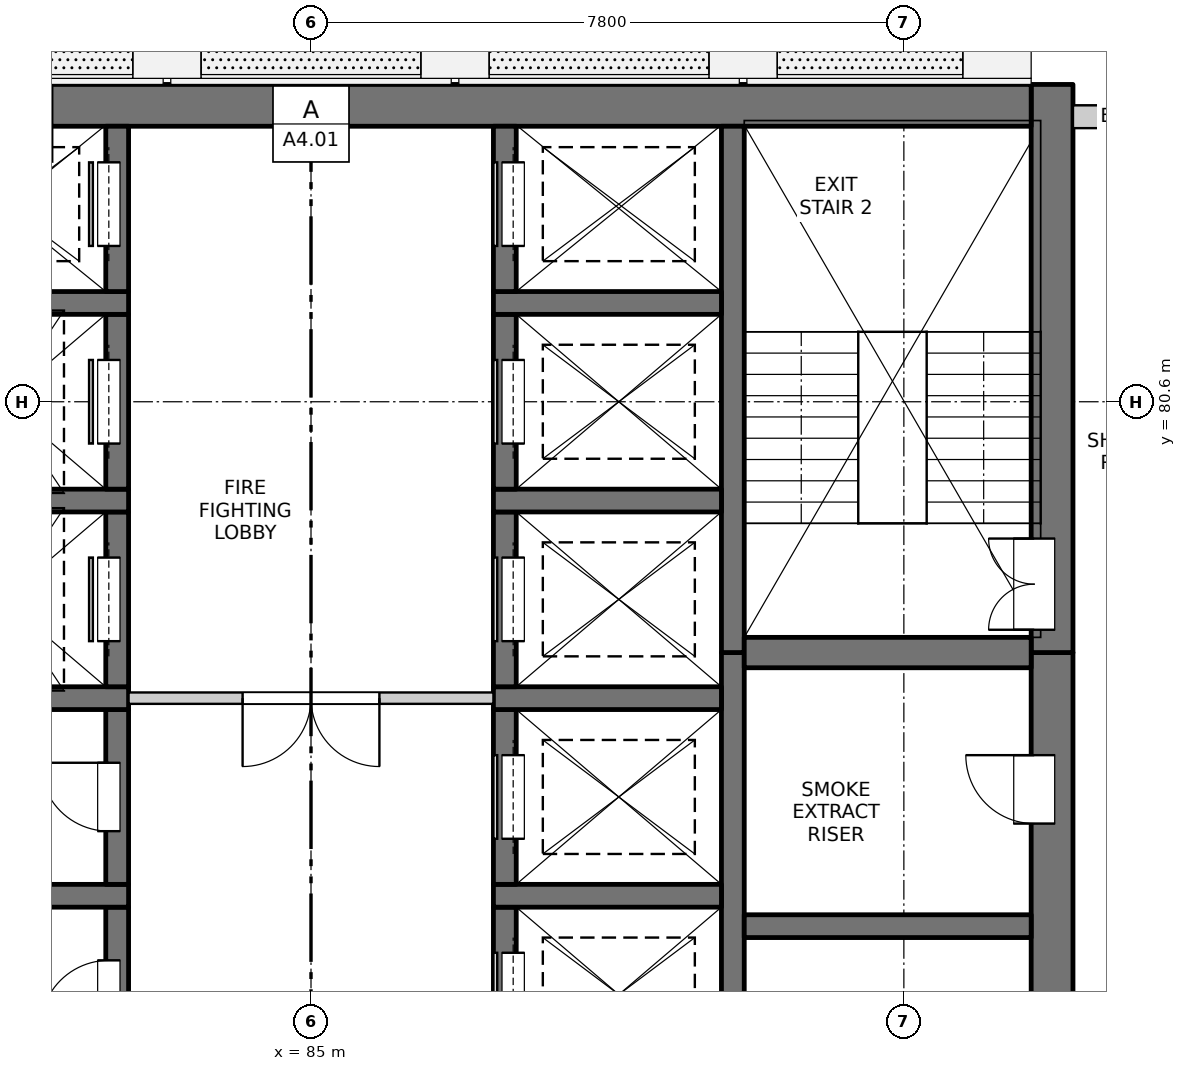
"""IFC4 building model, lengths in metres.
Left out: names, types, materials, properties, quantities, classifications, styles, units other than length and angle.
Written with IfcOpenShell. Run it as: python <this file> out.ifc"""

import sys

from ifc_helpers import new_model, si_unit, direction, frame, frame_2d, origin, place, context, subcontext, project, spatial, rectangle, extrude, element, fill, save


model = new_model("IFC4")
c1 = context("Model", 3, precision=1e-05, world=origin(), true_north=direction((0.0, 1.0)))
c2 = subcontext(c1, "Body", "Model", "MODEL_VIEW")
j1 = project(units=[si_unit("LENGTHUNIT", "METRE"), si_unit("PLANEANGLEUNIT", "RADIAN")], contexts=[c1])
p1 = place(None, origin())
s1 = spatial("IfcSite", under=j1, at=p1, CompositionType="ELEMENT")
p2 = place(p1, origin())
s2 = spatial("IfcBuilding", under=s1, at=p2, CompositionType="ELEMENT")
p3 = place(p2, frame((0.0, 0.0, 152.0)))
s3 = spatial("IfcBuildingStorey", under=s2, at=p3, CompositionType="ELEMENT", Elevation=152.0)
p4 = place(p3, frame((94.75, 61.95, -0.25), z_axis=(0.0, 0.0, 1.0), x_axis=(0.0, 1.0, 0.0)))
e1 = element("IfcWall", 1, at=p4, inside=s3, PredefinedType="SOLIDWALL", context=c2, shape_type="SweptSolid", body=[
    extrude(rectangle(XDim=15.35, YDim=0.55, at=frame_2d((7.675, 0.0))), origin(), (0.0, 0.0, 1.0), 3.4),
])
p5 = place(p4, frame((0.925, 0.0, 0.25)))
e2 = element("IfcOpeningElement", 2, at=p5, cuts=e1, PredefinedType="OPENING", context=c2, shape_type="SweptSolid", body=[
    extrude(rectangle(XDim=0.9, YDim=2.1, at=frame_2d((0.45, 1.05))), frame((0.0, 0.285, 0.0), z_axis=(0.0, -1.0, 0.0), x_axis=(1.0, 0.0, 0.0)), (0.0, 0.0, 1.0), 0.57),
])
p6 = place(p4, frame((3.8, 0.0, 0.25)))
e3 = element("IfcOpeningElement", 3, at=p6, cuts=e1, PredefinedType="OPENING", context=c2, shape_type="SweptSolid", body=[
    extrude(rectangle(XDim=0.9, YDim=2.1, at=frame_2d((0.45, 1.05))), frame((0.0, 0.285, 0.0), z_axis=(0.0, -1.0, 0.0), x_axis=(1.0, 0.0, 0.0)), (0.0, 0.0, 1.0), 0.57),
])
p7 = place(p4, frame((8.3, 0.0, 0.25)))
e4 = element("IfcOpeningElement", 4, at=p7, cuts=e1, PredefinedType="OPENING", context=c2, shape_type="SweptSolid", body=[
    extrude(rectangle(XDim=0.9, YDim=2.1, at=frame_2d((0.45, 1.05))), frame((0.0, 0.285, 0.0), z_axis=(0.0, -1.0, 0.0), x_axis=(1.0, 0.0, 0.0)), (0.0, 0.0, 1.0), 0.57),
])
p8 = place(p4, frame((13.1, 0.0, 0.25)))
e5 = element("IfcOpeningElement", 5, at=p8, cuts=e1, PredefinedType="OPENING", context=c2, shape_type="SweptSolid", body=[
    extrude(rectangle(XDim=0.9, YDim=2.1, at=frame_2d((0.45, 1.05))), frame((0.0, 0.285, 0.0), z_axis=(0.0, -1.0, 0.0), x_axis=(1.0, 0.0, 0.0)), (0.0, 0.0, 1.0), 0.57),
])
p9 = place(p3, frame((94.75, 77.3, -0.25), z_axis=(0.0, 0.0, 1.0), x_axis=(0.0, 1.0, 0.0)))
e6 = element("IfcWall", 6, at=p9, inside=s3, PredefinedType="SOLIDWALL", context=c2, shape_type="SweptSolid", body=[
    extrude(rectangle(XDim=7.475, YDim=0.55, at=frame_2d((3.737, 0.0))), origin(), (0.0, 0.0, 1.0), 3.4),
])
p10 = place(p9, frame((0.3, 0.0, 0.25)))
e7 = element("IfcOpeningElement", 7, at=p10, cuts=e6, PredefinedType="OPENING", context=c2, shape_type="SweptSolid", body=[
    extrude(rectangle(XDim=1.2, YDim=2.1, at=frame_2d((0.6, 1.05))), frame((0.0, 0.285, 0.0), z_axis=(0.0, -1.0, 0.0), x_axis=(1.0, 0.0, 0.0)), (0.0, 0.0, 1.0), 0.57),
])
p11 = place(p3, frame((75.525, 84.5, -0.25), z_axis=(0.0, 0.0, 1.0), x_axis=(1.0, 0.0, 0.0)))
e8 = element("IfcWall", 8, at=p11, inside=s3, PredefinedType="SOLIDWALL", context=c2, shape_type="SweptSolid", body=[
    extrude(rectangle(XDim=18.95, YDim=0.55, at=frame_2d((9.475, 0.0))), origin(), (0.0, 0.0, 1.0), 3.4),
])
p12 = place(p3, frame((90.55, 61.95, -0.25), z_axis=(0.0, 0.0, 1.0), x_axis=(0.0, 1.0, 0.0)))
e9 = element("IfcWall", 9, at=p12, inside=s3, PredefinedType="SOLIDWALL", context=c2, shape_type="SweptSolid", body=[
    extrude(rectangle(XDim=15.35, YDim=0.3, at=frame_2d((7.675, 0.0))), origin(), (0.0, 0.0, 1.0), 3.4),
])
p13 = place(p3, frame((90.55, 77.3, -0.25), z_axis=(0.0, 0.0, 1.0), x_axis=(0.0, 1.0, 0.0)))
e10 = element("IfcWall", 10, at=p13, inside=s3, PredefinedType="SOLIDWALL", context=c2, shape_type="SweptSolid", body=[
    extrude(rectangle(XDim=6.925, YDim=0.3, at=frame_2d((3.462, 0.0))), origin(), (0.0, 0.0, 1.0), 3.4),
])
p14 = place(p3, frame((82.45, 71.65, -0.25), z_axis=(0.0, 0.0, 1.0), x_axis=(0.0, 1.0, 0.0)))
e11 = element("IfcWall", 11, at=p14, inside=s3, PredefinedType="SOLIDWALL", context=c2, shape_type="SweptSolid", body=[
    extrude(rectangle(XDim=2.3, YDim=0.3, at=frame_2d((1.15, 0.0))), origin(), (0.0, 0.0, 1.0), 3.4),
])
p15 = place(p14, frame((0.7, 0.0, 0.25)))
e12 = element("IfcOpeningElement", 12, at=p15, cuts=e11, PredefinedType="OPENING", context=c2, shape_type="SweptSolid", body=[
    extrude(rectangle(XDim=0.9, YDim=2.1, at=frame_2d((0.45, 1.05))), frame((0.0, 0.16, 0.0), z_axis=(0.0, -1.0, 0.0), x_axis=(1.0, 0.0, 0.0)), (0.0, 0.0, 1.0), 0.32),
])
p16 = place(p3, frame((79.6, 74.1, -0.25), z_axis=(0.0, 0.0, 1.0), x_axis=(1.0, 0.0, 0.0)))
e13 = element("IfcWall", 13, at=p16, inside=s3, PredefinedType="SOLIDWALL", context=c2, shape_type="SweptSolid", body=[
    extrude(rectangle(XDim=3.0, YDim=0.3, at=frame_2d((1.5, 0.0))), origin(), (0.0, 0.0, 1.0), 3.4),
])
p17 = place(p3, frame((82.45, 74.25, -0.25), z_axis=(0.0, 0.0, 1.0), x_axis=(0.0, 1.0, 0.0)))
e14 = element("IfcWall", 14, at=p17, inside=s3, PredefinedType="SOLIDWALL", context=c2, shape_type="SweptSolid", body=[
    extrude(rectangle(XDim=2.3, YDim=0.3, at=frame_2d((1.15, 0.0))), origin(), (0.0, 0.0, 1.0), 3.4),
])
p18 = place(p17, frame((0.7, 0.0, 0.25)))
e15 = element("IfcOpeningElement", 15, at=p18, cuts=e14, PredefinedType="OPENING", context=c2, shape_type="SweptSolid", body=[
    extrude(rectangle(XDim=0.9, YDim=2.1, at=frame_2d((0.45, 1.05))), frame((0.0, 0.16, 0.0), z_axis=(0.0, -1.0, 0.0), x_axis=(1.0, 0.0, 0.0)), (0.0, 0.0, 1.0), 0.32),
])
p19 = place(p3, frame((79.6, 76.7, -0.25), z_axis=(0.0, 0.0, 1.0), x_axis=(1.0, 0.0, 0.0)))
e16 = element("IfcWall", 16, at=p19, inside=s3, PredefinedType="SOLIDWALL", context=c2, shape_type="SweptSolid", body=[
    extrude(rectangle(XDim=3.0, YDim=0.3, at=frame_2d((1.5, 0.0))), origin(), (0.0, 0.0, 1.0), 3.4),
])
p20 = place(p3, frame((82.45, 76.85, -0.25), z_axis=(0.0, 0.0, 1.0), x_axis=(0.0, 1.0, 0.0)))
e17 = element("IfcWall", 17, at=p20, inside=s3, PredefinedType="SOLIDWALL", context=c2, shape_type="SweptSolid", body=[
    extrude(rectangle(XDim=2.3, YDim=0.3, at=frame_2d((1.15, 0.0))), origin(), (0.0, 0.0, 1.0), 3.4),
])
p21 = place(p20, frame((0.6, 0.0, 0.25)))
e18 = element("IfcOpeningElement", 18, at=p21, cuts=e17, PredefinedType="OPENING", context=c2, shape_type="SweptSolid", body=[
    extrude(rectangle(XDim=1.1, YDim=2.1, at=frame_2d((0.55, 1.05))), frame((0.0, 0.16, 0.0), z_axis=(0.0, -1.0, 0.0), x_axis=(1.0, 0.0, 0.0)), (0.0, 0.0, 1.0), 0.32),
])
p22 = place(p3, frame((79.6, 79.3, -0.25), z_axis=(0.0, 0.0, 1.0), x_axis=(1.0, 0.0, 0.0)))
e19 = element("IfcWall", 19, at=p22, inside=s3, PredefinedType="SOLIDWALL", context=c2, shape_type="SweptSolid", body=[
    extrude(rectangle(XDim=3.0, YDim=0.3, at=frame_2d((1.5, 0.0))), origin(), (0.0, 0.0, 1.0), 3.4),
])
p23 = place(p3, frame((82.45, 79.45, -0.25), z_axis=(0.0, 0.0, 1.0), x_axis=(0.0, 1.0, 0.0)))
e20 = element("IfcWall", 20, at=p23, inside=s3, PredefinedType="SOLIDWALL", context=c2, shape_type="SweptSolid", body=[
    extrude(rectangle(XDim=2.3, YDim=0.3, at=frame_2d((1.15, 0.0))), origin(), (0.0, 0.0, 1.0), 3.4),
])
p24 = place(p23, frame((0.6, 0.0, 0.25)))
e21 = element("IfcOpeningElement", 21, at=p24, cuts=e20, PredefinedType="OPENING", context=c2, shape_type="SweptSolid", body=[
    extrude(rectangle(XDim=1.1, YDim=2.1, at=frame_2d((0.55, 1.05))), frame((0.0, 0.16, 0.0), z_axis=(0.0, -1.0, 0.0), x_axis=(1.0, 0.0, 0.0)), (0.0, 0.0, 1.0), 0.32),
])
p25 = place(p3, frame((79.6, 81.9, -0.25), z_axis=(0.0, 0.0, 1.0), x_axis=(1.0, 0.0, 0.0)))
e22 = element("IfcWall", 22, at=p25, inside=s3, PredefinedType="SOLIDWALL", context=c2, shape_type="SweptSolid", body=[
    extrude(rectangle(XDim=3.0, YDim=0.3, at=frame_2d((1.5, 0.0))), origin(), (0.0, 0.0, 1.0), 3.4),
])
p26 = place(p3, frame((82.45, 82.05, -0.25), z_axis=(0.0, 0.0, 1.0), x_axis=(0.0, 1.0, 0.0)))
e23 = element("IfcWall", 23, at=p26, inside=s3, PredefinedType="SOLIDWALL", context=c2, shape_type="SweptSolid", body=[
    extrude(rectangle(XDim=2.175, YDim=0.3, at=frame_2d((1.087, 0.0))), origin(), (0.0, 0.0, 1.0), 3.4),
])
p27 = place(p26, frame((0.6, 0.0, 0.25)))
e24 = element("IfcOpeningElement", 24, at=p27, cuts=e23, PredefinedType="OPENING", context=c2, shape_type="SweptSolid", body=[
    extrude(rectangle(XDim=1.1, YDim=2.1, at=frame_2d((0.55, 1.05))), frame((0.0, 0.16, 0.0), z_axis=(0.0, -1.0, 0.0), x_axis=(1.0, 0.0, 0.0)), (0.0, 0.0, 1.0), 0.32),
])
p28 = place(p3, frame((87.55, 71.65, -0.25), z_axis=(0.0, 0.0, 1.0), x_axis=(0.0, 1.0, 0.0)))
e25 = element("IfcWall", 25, at=p28, inside=s3, PredefinedType="SOLIDWALL", context=c2, shape_type="SweptSolid", body=[
    extrude(rectangle(XDim=2.3, YDim=0.3, at=frame_2d((1.15, 0.0))), origin(), (0.0, 0.0, 1.0), 3.4),
])
p29 = place(p28, frame((0.6, 0.0, 0.25)))
e26 = element("IfcOpeningElement", 26, at=p29, cuts=e25, PredefinedType="OPENING", context=c2, shape_type="SweptSolid", body=[
    extrude(rectangle(XDim=1.1, YDim=2.1, at=frame_2d((0.55, 1.05))), frame((0.0, 0.16, 0.0), z_axis=(0.0, -1.0, 0.0), x_axis=(1.0, 0.0, 0.0)), (0.0, 0.0, 1.0), 0.32),
])
p30 = place(p3, frame((87.4, 74.1, -0.25), z_axis=(0.0, 0.0, 1.0), x_axis=(1.0, 0.0, 0.0)))
e27 = element("IfcWall", 27, at=p30, inside=s3, PredefinedType="SOLIDWALL", context=c2, shape_type="SweptSolid", body=[
    extrude(rectangle(XDim=3.0, YDim=0.3, at=frame_2d((1.5, 0.0))), origin(), (0.0, 0.0, 1.0), 3.4),
])
p31 = place(p3, frame((87.55, 74.25, -0.25), z_axis=(0.0, 0.0, 1.0), x_axis=(0.0, 1.0, 0.0)))
e28 = element("IfcWall", 28, at=p31, inside=s3, PredefinedType="SOLIDWALL", context=c2, shape_type="SweptSolid", body=[
    extrude(rectangle(XDim=2.3, YDim=0.3, at=frame_2d((1.15, 0.0))), origin(), (0.0, 0.0, 1.0), 3.4),
])
p32 = place(p31, frame((0.6, 0.0, 0.25)))
e29 = element("IfcOpeningElement", 29, at=p32, cuts=e28, PredefinedType="OPENING", context=c2, shape_type="SweptSolid", body=[
    extrude(rectangle(XDim=1.1, YDim=2.1, at=frame_2d((0.55, 1.05))), frame((0.0, 0.16, 0.0), z_axis=(0.0, -1.0, 0.0), x_axis=(1.0, 0.0, 0.0)), (0.0, 0.0, 1.0), 0.32),
])
p33 = place(p3, frame((87.4, 76.7, -0.25), z_axis=(0.0, 0.0, 1.0), x_axis=(1.0, 0.0, 0.0)))
e30 = element("IfcWall", 30, at=p33, inside=s3, PredefinedType="SOLIDWALL", context=c2, shape_type="SweptSolid", body=[
    extrude(rectangle(XDim=3.0, YDim=0.3, at=frame_2d((1.5, 0.0))), origin(), (0.0, 0.0, 1.0), 3.4),
])
p34 = place(p3, frame((87.55, 76.85, -0.25), z_axis=(0.0, 0.0, 1.0), x_axis=(0.0, 1.0, 0.0)))
e31 = element("IfcWall", 31, at=p34, inside=s3, PredefinedType="SOLIDWALL", context=c2, shape_type="SweptSolid", body=[
    extrude(rectangle(XDim=2.3, YDim=0.3, at=frame_2d((1.15, 0.0))), origin(), (0.0, 0.0, 1.0), 3.4),
])
p35 = place(p34, frame((0.6, 0.0, 0.25)))
e32 = element("IfcOpeningElement", 32, at=p35, cuts=e31, PredefinedType="OPENING", context=c2, shape_type="SweptSolid", body=[
    extrude(rectangle(XDim=1.1, YDim=2.1, at=frame_2d((0.55, 1.05))), frame((0.0, 0.16, 0.0), z_axis=(0.0, -1.0, 0.0), x_axis=(1.0, 0.0, 0.0)), (0.0, 0.0, 1.0), 0.32),
])
p36 = place(p3, frame((87.4, 79.3, -0.25), z_axis=(0.0, 0.0, 1.0), x_axis=(1.0, 0.0, 0.0)))
e33 = element("IfcWall", 33, at=p36, inside=s3, PredefinedType="SOLIDWALL", context=c2, shape_type="SweptSolid", body=[
    extrude(rectangle(XDim=3.0, YDim=0.3, at=frame_2d((1.5, 0.0))), origin(), (0.0, 0.0, 1.0), 3.4),
])
p37 = place(p3, frame((87.55, 79.45, -0.25), z_axis=(0.0, 0.0, 1.0), x_axis=(0.0, 1.0, 0.0)))
e34 = element("IfcWall", 34, at=p37, inside=s3, PredefinedType="SOLIDWALL", context=c2, shape_type="SweptSolid", body=[
    extrude(rectangle(XDim=2.3, YDim=0.3, at=frame_2d((1.15, 0.0))), origin(), (0.0, 0.0, 1.0), 3.4),
])
p38 = place(p37, frame((0.6, 0.0, 0.25)))
e35 = element("IfcOpeningElement", 35, at=p38, cuts=e34, PredefinedType="OPENING", context=c2, shape_type="SweptSolid", body=[
    extrude(rectangle(XDim=1.1, YDim=2.1, at=frame_2d((0.55, 1.05))), frame((0.0, 0.16, 0.0), z_axis=(0.0, -1.0, 0.0), x_axis=(1.0, 0.0, 0.0)), (0.0, 0.0, 1.0), 0.32),
])
p39 = place(p3, frame((87.4, 81.9, -0.25), z_axis=(0.0, 0.0, 1.0), x_axis=(1.0, 0.0, 0.0)))
e36 = element("IfcWall", 36, at=p39, inside=s3, PredefinedType="SOLIDWALL", context=c2, shape_type="SweptSolid", body=[
    extrude(rectangle(XDim=3.0, YDim=0.3, at=frame_2d((1.5, 0.0))), origin(), (0.0, 0.0, 1.0), 3.4),
])
p40 = place(p3, frame((87.55, 82.05, -0.25), z_axis=(0.0, 0.0, 1.0), x_axis=(0.0, 1.0, 0.0)))
e37 = element("IfcWall", 37, at=p40, inside=s3, PredefinedType="SOLIDWALL", context=c2, shape_type="SweptSolid", body=[
    extrude(rectangle(XDim=2.175, YDim=0.3, at=frame_2d((1.087, 0.0))), origin(), (0.0, 0.0, 1.0), 3.4),
])
p41 = place(p40, frame((0.6, 0.0, 0.25)))
e38 = element("IfcOpeningElement", 38, at=p41, cuts=e37, PredefinedType="OPENING", context=c2, shape_type="SweptSolid", body=[
    extrude(rectangle(XDim=1.1, YDim=2.1, at=frame_2d((0.55, 1.05))), frame((0.0, 0.16, 0.0), z_axis=(0.0, -1.0, 0.0), x_axis=(1.0, 0.0, 0.0)), (0.0, 0.0, 1.0), 0.32),
])
p42 = place(p3, frame((90.7, 73.7, -0.25), z_axis=(0.0, 0.0, 1.0), x_axis=(1.0, 0.0, 0.0)))
e39 = element("IfcWall", 39, at=p42, inside=s3, PredefinedType="SOLIDWALL", context=c2, shape_type="SweptSolid", body=[
    extrude(rectangle(XDim=3.775, YDim=0.3, at=frame_2d((1.888, 0.0))), origin(), (0.0, 0.0, 1.0), 3.4),
])
p43 = place(p3, frame((90.7, 77.3, -0.25), z_axis=(0.0, 0.0, 1.0), x_axis=(1.0, 0.0, 0.0)))
e40 = element("IfcWall", 40, at=p43, inside=s3, PredefinedType="SOLIDWALL", context=c2, shape_type="SweptSolid", body=[
    extrude(rectangle(XDim=3.775, YDim=0.4, at=frame_2d((1.888, 0.0))), origin(), (0.0, 0.0, 1.0), 3.4),
])
p44 = place(p3, frame((95.025, 84.35, 0.0), z_axis=(0.0, 0.0, 1.0), x_axis=(1.0, 0.0, 0.0)))
e41 = element("IfcWall", 41, at=p44, inside=s3, PredefinedType="SOLIDWALL", context=c2, shape_type="SweptSolid", body=[
    extrude(rectangle(XDim=1.3, YDim=0.3, at=frame_2d((0.65, 0.0))), origin(), (0.0, 0.0, 1.0), 2.7),
])
p45 = place(p3, frame((82.6, 76.7, 0.0), z_axis=(0.0, 0.0, 1.0), x_axis=(1.0, 0.0, 0.0)))
e42 = element("IfcWall", 42, at=p45, inside=s3, PredefinedType="PARTITIONING", context=c2, shape_type="SweptSolid", body=[
    extrude(rectangle(XDim=4.8, YDim=0.15, at=frame_2d((2.4, 0.0))), origin(), (0.0, 0.0, 1.0), 3.15),
])
p46 = place(p45, frame((1.5, 0.0, 0.0)))
e43 = element("IfcOpeningElement", 43, at=p46, cuts=e42, PredefinedType="OPENING", context=c2, shape_type="SweptSolid", body=[
    extrude(rectangle(XDim=1.8, YDim=2.1, at=frame_2d((0.9, 1.05))), frame((0.0, 0.085, 0.0), z_axis=(0.0, -1.0, 0.0), x_axis=(1.0, 0.0, 0.0)), (0.0, 0.0, 1.0), 0.17),
])
p47 = place(p15, origin())
e44 = element("IfcDoor", 44, at=p47, inside=s3, OperationType="SINGLE_SWING_LEFT", PredefinedType="DOOR", context=c2, shape_type="SweptSolid", body=[
    extrude(rectangle(XDim=0.9, YDim=2.1, at=frame_2d((0.45, 1.05))), frame((0.0, 0.135, 0.0), z_axis=(0.0, -1.0, 0.0), x_axis=(1.0, 0.0, 0.0)), (0.0, 0.0, 1.0), 0.05),
])
fill(e12, e44)
p48 = place(p29, origin())
e45 = element("IfcDoor", 45, at=p48, inside=s3, OperationType="SLIDING_TO_LEFT", PredefinedType="DOOR", context=c2, shape_type="SweptSolid", body=[
    extrude(rectangle(XDim=1.1, YDim=2.1, at=frame_2d((0.55, 1.05))), frame((0.0, -0.085, 0.0), z_axis=(0.0, -1.0, 0.0), x_axis=(1.0, 0.0, 0.0)), (0.0, 0.0, 1.0), 0.05),
])
fill(e26, e45)
p49 = place(p18, origin())
e46 = element("IfcDoor", 46, at=p49, inside=s3, OperationType="SINGLE_SWING_RIGHT", PredefinedType="DOOR", context=c2, shape_type="SweptSolid", body=[
    extrude(rectangle(XDim=0.9, YDim=2.1, at=frame_2d((0.45, 1.05))), frame((0.0, 0.135, 0.0), z_axis=(0.0, -1.0, 0.0), x_axis=(1.0, 0.0, 0.0)), (0.0, 0.0, 1.0), 0.05),
])
fill(e15, e46)
p50 = place(p32, origin())
e47 = element("IfcDoor", 47, at=p50, inside=s3, OperationType="SLIDING_TO_LEFT", PredefinedType="DOOR", context=c2, shape_type="SweptSolid", body=[
    extrude(rectangle(XDim=1.1, YDim=2.1, at=frame_2d((0.55, 1.05))), frame((0.0, -0.085, 0.0), z_axis=(0.0, -1.0, 0.0), x_axis=(1.0, 0.0, 0.0)), (0.0, 0.0, 1.0), 0.05),
])
fill(e29, e47)
p51 = place(p8, origin())
e48 = element("IfcDoor", 48, at=p51, inside=s3, OperationType="SINGLE_SWING_RIGHT", PredefinedType="DOOR", context=c2, shape_type="SweptSolid", body=[
    extrude(rectangle(XDim=0.9, YDim=2.1, at=frame_2d((0.45, 1.05))), frame((0.0, 0.26, 0.0), z_axis=(0.0, -1.0, 0.0), x_axis=(1.0, 0.0, 0.0)), (0.0, 0.0, 1.0), 0.05),
])
fill(e5, e48)
p52 = place(p46, origin())
e49 = element("IfcDoor", 49, at=p52, inside=s3, OperationType="DOUBLE_DOOR_SINGLE_SWING", PredefinedType="DOOR", context=c2, shape_type="SweptSolid", body=[
    extrude(rectangle(XDim=1.8, YDim=2.1, at=frame_2d((0.9, 1.05))), frame((0.0, 0.025, 0.0), z_axis=(0.0, -1.0, 0.0), x_axis=(1.0, 0.0, 0.0)), (0.0, 0.0, 1.0), 0.05),
])
fill(e43, e49)
p53 = place(p21, origin())
e50 = element("IfcDoor", 50, at=p53, inside=s3, OperationType="SLIDING_TO_LEFT", PredefinedType="DOOR", context=c2, shape_type="SweptSolid", body=[
    extrude(rectangle(XDim=1.1, YDim=2.1, at=frame_2d((0.55, 1.05))), frame((0.0, 0.135, 0.0), z_axis=(0.0, -1.0, 0.0), x_axis=(1.0, 0.0, 0.0)), (0.0, 0.0, 1.0), 0.05),
])
fill(e18, e50)
p54 = place(p35, origin())
e51 = element("IfcDoor", 51, at=p54, inside=s3, OperationType="SLIDING_TO_LEFT", PredefinedType="DOOR", context=c2, shape_type="SweptSolid", body=[
    extrude(rectangle(XDim=1.1, YDim=2.1, at=frame_2d((0.55, 1.05))), frame((0.0, -0.085, 0.0), z_axis=(0.0, -1.0, 0.0), x_axis=(1.0, 0.0, 0.0)), (0.0, 0.0, 1.0), 0.05),
])
fill(e32, e51)
p55 = place(p10, origin())
e52 = element("IfcDoor", 52, at=p55, inside=s3, OperationType="DOUBLE_DOOR_SINGLE_SWING", PredefinedType="DOOR", context=c2, shape_type="SweptSolid", body=[
    extrude(rectangle(XDim=1.2, YDim=2.1, at=frame_2d((0.6, 1.05))), frame((0.0, 0.26, 0.0), z_axis=(0.0, -1.0, 0.0), x_axis=(1.0, 0.0, 0.0)), (0.0, 0.0, 1.0), 0.05),
])
fill(e7, e52)
p56 = place(p24, origin())
e53 = element("IfcDoor", 53, at=p56, inside=s3, OperationType="SLIDING_TO_LEFT", PredefinedType="DOOR", context=c2, shape_type="SweptSolid", body=[
    extrude(rectangle(XDim=1.1, YDim=2.1, at=frame_2d((0.55, 1.05))), frame((0.0, 0.135, 0.0), z_axis=(0.0, -1.0, 0.0), x_axis=(1.0, 0.0, 0.0)), (0.0, 0.0, 1.0), 0.05),
])
fill(e21, e53)
p57 = place(p38, origin())
e54 = element("IfcDoor", 54, at=p57, inside=s3, OperationType="SLIDING_TO_RIGHT", PredefinedType="DOOR", context=c2, shape_type="SweptSolid", body=[
    extrude(rectangle(XDim=1.1, YDim=2.1, at=frame_2d((0.55, 1.05))), frame((0.0, -0.085, 0.0), z_axis=(0.0, -1.0, 0.0), x_axis=(1.0, 0.0, 0.0)), (0.0, 0.0, 1.0), 0.05),
])
fill(e35, e54)
p58 = place(p27, origin())
e55 = element("IfcDoor", 55, at=p58, inside=s3, OperationType="SLIDING_TO_RIGHT", PredefinedType="DOOR", context=c2, shape_type="SweptSolid", body=[
    extrude(rectangle(XDim=1.1, YDim=2.1, at=frame_2d((0.55, 1.05))), frame((0.0, 0.135, 0.0), z_axis=(0.0, -1.0, 0.0), x_axis=(1.0, 0.0, 0.0)), (0.0, 0.0, 1.0), 0.05),
])
fill(e24, e55)
p59 = place(p41, origin())
e56 = element("IfcDoor", 56, at=p59, inside=s3, OperationType="SLIDING_TO_RIGHT", PredefinedType="DOOR", context=c2, shape_type="SweptSolid", body=[
    extrude(rectangle(XDim=1.1, YDim=2.1, at=frame_2d((0.55, 1.05))), frame((0.0, -0.085, 0.0), z_axis=(0.0, -1.0, 0.0), x_axis=(1.0, 0.0, 0.0)), (0.0, 0.0, 1.0), 0.05),
])
fill(e38, e56)
save(model, sys.argv[1])
